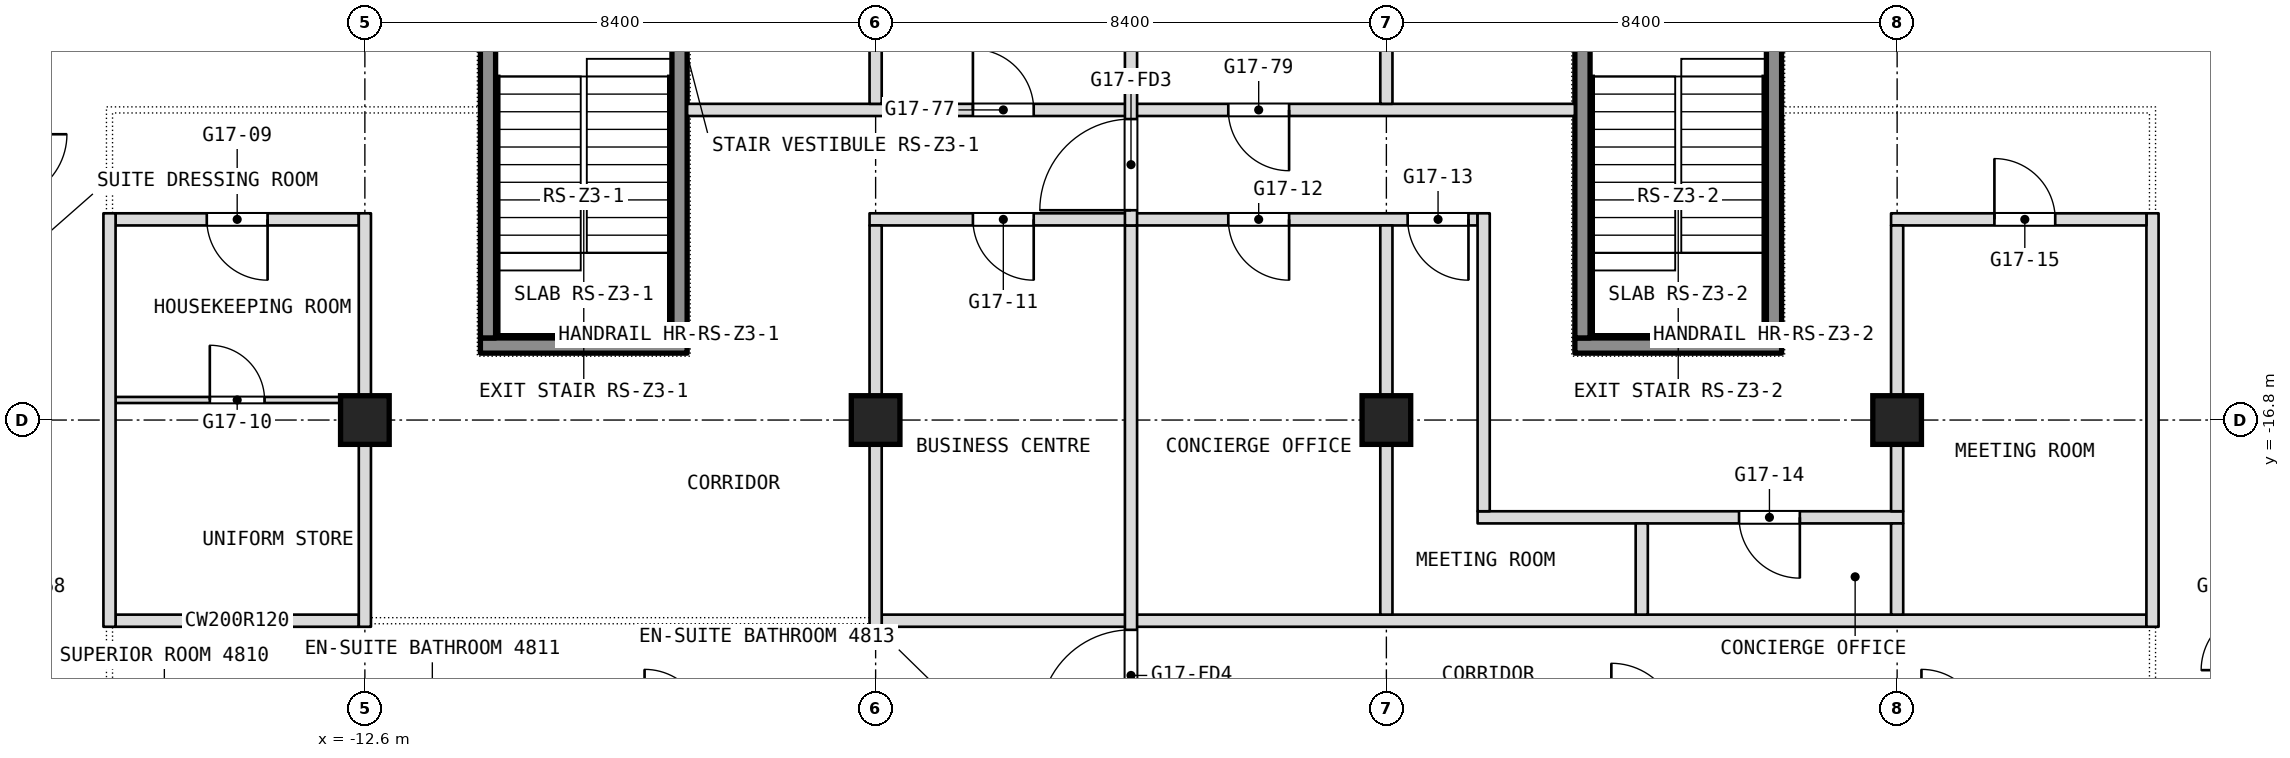
"""IFC4 building model, lengths in metres.
Left out: names, types, materials, properties, quantities, classifications, styles, units other than length and angle.
Written with IfcOpenShell. Run it as: python <this file> out.ifc"""

import sys

from ifc_helpers import new_model, si_unit, direction, frame, frame_2d, origin, origin_2d, place, context, subcontext, project, spatial, rectangle, extrude, element, fill, save


model = new_model("IFC4")
c1 = context("Model", 3, precision=1e-05, world=origin(), true_north=direction((0.0, 1.0)))
c2 = subcontext(c1, "Body", "Model", "MODEL_VIEW")
j1 = project(units=[si_unit("LENGTHUNIT", "METRE"), si_unit("PLANEANGLEUNIT", "RADIAN")], contexts=[c1])
p1 = place(None, origin())
s1 = spatial("IfcSite", under=j1, at=p1, CompositionType="ELEMENT")
p2 = place(p1, origin())
s2 = spatial("IfcBuilding", under=s1, at=p2, CompositionType="ELEMENT")
p3 = place(p2, frame((0.0, 0.0, 209.3)))
s3 = spatial("IfcBuildingStorey", under=s2, at=p3, CompositionType="ELEMENT", Elevation=209.3)
for number, where, z_axis, x_axis in (
    (1, (-12.6, -16.8, 0.0), (0.0, 0.0, 1.0), (1.0, 0.0, 0.0)),
    (2, (-4.2, -16.8, 0.0), (0.0, 0.0, 1.0), (1.0, 0.0, 0.0)),
    (3, (4.2, -16.8, 0.0), (0.0, 0.0, 1.0), (1.0, 0.0, 0.0)),
    (4, (12.6, -16.8, 0.0), (0.0, 0.0, 1.0), (1.0, 0.0, 0.0)),
):
    element("IfcColumn", number, at=place(p3, frame(where, z_axis=z_axis, x_axis=x_axis)), inside=s3, PredefinedType="COLUMN", context=c2, shape_type="SweptSolid", body=[
        extrude(rectangle(XDim=0.8, YDim=0.8, at=origin_2d()), origin(), (0.0, 0.0, 1.0), 3.6),
    ])
p4 = place(p3, frame((-16.7, -20.1, 0.0), z_axis=(0.0, 0.0, 1.0), x_axis=(1.0, 0.0, 0.0)))
e5 = element("IfcWall", 5, at=p4, inside=s3, PredefinedType="PARTITIONING", context=c2, shape_type="SweptSolid", body=[
    extrude(rectangle(XDim=4.0, YDim=0.2, at=frame_2d((2.0, 0.0))), origin(), (0.0, 0.0, 1.0), 3.34),
])
p5 = place(p3, frame((-4.1, -20.1, 0.0), z_axis=(0.0, 0.0, 1.0), x_axis=(1.0, 0.0, 0.0)))
e6 = element("IfcWall", 6, at=p5, inside=s3, PredefinedType="PARTITIONING", context=c2, shape_type="SweptSolid", body=[
    extrude(rectangle(XDim=20.8, YDim=0.2, at=frame_2d((10.4, 0.0))), origin(), (0.0, 0.0, 1.0), 3.34),
])
p6 = place(p3, frame((5.7, -18.4, 0.0), z_axis=(0.0, 0.0, 1.0), x_axis=(1.0, 0.0, 0.0)))
e7 = element("IfcWall", 7, at=p6, inside=s3, PredefinedType="PARTITIONING", context=c2, shape_type="SweptSolid", body=[
    extrude(rectangle(XDim=7.0, YDim=0.2, at=frame_2d((3.5, 0.0))), origin(), (0.0, 0.0, 1.0), 3.34),
])
p7 = place(p6, frame((4.3, 0.0, 0.0)))
e8 = element("IfcOpeningElement", 8, at=p7, cuts=e7, PredefinedType="OPENING", context=c2, shape_type="SweptSolid", body=[
    extrude(rectangle(XDim=1.0, YDim=2.1, at=frame_2d((0.5, 1.05))), frame((0.0, 0.1, 0.0), z_axis=(0.0, -1.0, 0.0), x_axis=(1.0, 0.0, 0.0)), (0.0, 0.0, 1.0), 0.2),
])
p8 = place(p3, frame((16.8, -20.2, 0.0), z_axis=(0.0, 0.0, 1.0), x_axis=(0.0, 1.0, 0.0)))
e9 = element("IfcWall", 9, at=p8, inside=s3, PredefinedType="PARTITIONING", context=c2, shape_type="SweptSolid", body=[
    extrude(rectangle(XDim=6.8, YDim=0.2, at=frame_2d((3.4, 0.0))), origin(), (0.0, 0.0, 1.0), 3.34),
])
p9 = place(p3, frame((-16.7, -16.47, 0.0), z_axis=(0.0, 0.0, 1.0), x_axis=(1.0, 0.0, 0.0)))
e10 = element("IfcWall", 10, at=p9, inside=s3, PredefinedType="PARTITIONING", context=c2, shape_type="SweptSolid", body=[
    extrude(rectangle(XDim=4.0, YDim=0.1, at=frame_2d((2.0, 0.0))), origin(), (0.0, 0.0, 1.0), 3.34),
])
p10 = place(p9, frame((1.55, 0.0, 0.0)))
e11 = element("IfcOpeningElement", 11, at=p10, cuts=e10, PredefinedType="OPENING", context=c2, shape_type="SweptSolid", body=[
    extrude(rectangle(XDim=0.9, YDim=2.1, at=frame_2d((0.45, 1.05))), frame((0.0, 0.05, 0.0), z_axis=(0.0, -1.0, 0.0), x_axis=(1.0, 0.0, 0.0)), (0.0, 0.0, 1.0), 0.1),
])
p11 = place(p3, frame((-16.7, -13.5, 0.0), z_axis=(0.0, 0.0, 1.0), x_axis=(1.0, 0.0, 0.0)))
e12 = element("IfcWall", 12, at=p11, inside=s3, PredefinedType="PARTITIONING", context=c2, shape_type="SweptSolid", body=[
    extrude(rectangle(XDim=4.0, YDim=0.2, at=frame_2d((2.0, 0.0))), origin(), (0.0, 0.0, 1.0), 3.34),
])
p12 = place(p11, frame((1.5, 0.0, 0.0)))
e13 = element("IfcOpeningElement", 13, at=p12, cuts=e12, PredefinedType="OPENING", context=c2, shape_type="SweptSolid", body=[
    extrude(rectangle(XDim=1.0, YDim=2.1, at=frame_2d((0.5, 1.05))), frame((0.0, 0.1, 0.0), z_axis=(0.0, -1.0, 0.0), x_axis=(1.0, 0.0, 0.0)), (0.0, 0.0, 1.0), 0.2),
])
p13 = place(p3, frame((-4.3, -13.5, 0.0), z_axis=(0.0, 0.0, 1.0), x_axis=(1.0, 0.0, 0.0)))
e14 = element("IfcWall", 14, at=p13, inside=s3, PredefinedType="PARTITIONING", context=c2, shape_type="SweptSolid", body=[
    extrude(rectangle(XDim=10.0, YDim=0.2, at=frame_2d((5.0, 0.0))), origin(), (0.0, 0.0, 1.0), 3.34),
])
p14 = place(p13, frame((1.7, 0.0, 0.0)))
e15 = element("IfcOpeningElement", 15, at=p14, cuts=e14, PredefinedType="OPENING", context=c2, shape_type="SweptSolid", body=[
    extrude(rectangle(XDim=1.0, YDim=2.1, at=frame_2d((0.5, 1.05))), frame((0.0, 0.1, 0.0), z_axis=(0.0, -1.0, 0.0), x_axis=(1.0, 0.0, 0.0)), (0.0, 0.0, 1.0), 0.2),
])
p15 = place(p13, frame((5.9, 0.0, 0.0)))
e16 = element("IfcOpeningElement", 16, at=p15, cuts=e14, PredefinedType="OPENING", context=c2, shape_type="SweptSolid", body=[
    extrude(rectangle(XDim=1.0, YDim=2.1, at=frame_2d((0.5, 1.05))), frame((0.0, 0.1, 0.0), z_axis=(0.0, -1.0, 0.0), x_axis=(1.0, 0.0, 0.0)), (0.0, 0.0, 1.0), 0.2),
])
p16 = place(p13, frame((8.85, 0.0, 0.0)))
e17 = element("IfcOpeningElement", 17, at=p16, cuts=e14, PredefinedType="OPENING", context=c2, shape_type="SweptSolid", body=[
    extrude(rectangle(XDim=1.0, YDim=2.1, at=frame_2d((0.5, 1.05))), frame((0.0, 0.1, 0.0), z_axis=(0.0, -1.0, 0.0), x_axis=(1.0, 0.0, 0.0)), (0.0, 0.0, 1.0), 0.2),
])
p17 = place(p3, frame((12.5, -13.5, 0.0), z_axis=(0.0, 0.0, 1.0), x_axis=(1.0, 0.0, 0.0)))
e18 = element("IfcWall", 18, at=p17, inside=s3, PredefinedType="PARTITIONING", context=c2, shape_type="SweptSolid", body=[
    extrude(rectangle(XDim=4.2, YDim=0.2, at=frame_2d((2.1, 0.0))), origin(), (0.0, 0.0, 1.0), 3.34),
])
p18 = place(p17, frame((1.7, 0.0, 0.0)))
e19 = element("IfcOpeningElement", 19, at=p18, cuts=e18, PredefinedType="OPENING", context=c2, shape_type="SweptSolid", body=[
    extrude(rectangle(XDim=1.0, YDim=2.1, at=frame_2d((0.5, 1.05))), frame((0.0, 0.1, 0.0), z_axis=(0.0, -1.0, 0.0), x_axis=(1.0, 0.0, 0.0)), (0.0, 0.0, 1.0), 0.2),
])
p19 = place(p3, frame((12.6, -20.0, 0.0), z_axis=(0.0, 0.0, 1.0), x_axis=(0.0, 1.0, 0.0)))
e20 = element("IfcWall", 20, at=p19, inside=s3, PredefinedType="PARTITIONING", context=c2, shape_type="SweptSolid", body=[
    extrude(rectangle(XDim=1.5, YDim=0.2, at=frame_2d((0.75, 0.0))), origin(), (0.0, 0.0, 1.0), 3.34),
])
p20 = place(p3, frame((12.6, -18.3, 0.0), z_axis=(0.0, 0.0, 1.0), x_axis=(0.0, 1.0, 0.0)))
e21 = element("IfcWall", 21, at=p20, inside=s3, PredefinedType="PARTITIONING", context=c2, shape_type="SweptSolid", body=[
    extrude(rectangle(XDim=4.7, YDim=0.2, at=frame_2d((2.35, 0.0))), origin(), (0.0, 0.0, 1.0), 3.34),
])
p21 = place(p3, frame((-7.3, -11.7, 0.0), z_axis=(0.0, 0.0, 1.0), x_axis=(1.0, 0.0, 0.0)))
e22 = element("IfcWall", 22, at=p21, inside=s3, PredefinedType="PARTITIONING", context=c2, shape_type="SweptSolid", body=[
    extrude(rectangle(XDim=14.6, YDim=0.2, at=frame_2d((7.3, 0.0))), origin(), (0.0, 0.0, 1.0), 3.34),
])
p22 = place(p21, frame((4.7, 0.0, 0.0)))
e23 = element("IfcOpeningElement", 23, at=p22, cuts=e22, PredefinedType="OPENING", context=c2, shape_type="SweptSolid", body=[
    extrude(rectangle(XDim=1.0, YDim=2.1, at=frame_2d((0.5, 1.05))), frame((0.0, 0.1, 0.0), z_axis=(0.0, -1.0, 0.0), x_axis=(1.0, 0.0, 0.0)), (0.0, 0.0, 1.0), 0.2),
])
p23 = place(p21, frame((8.9, 0.0, 0.0)))
e24 = element("IfcOpeningElement", 24, at=p23, cuts=e22, PredefinedType="OPENING", context=c2, shape_type="SweptSolid", body=[
    extrude(rectangle(XDim=1.0, YDim=2.1, at=frame_2d((0.5, 1.05))), frame((0.0, 0.1, 0.0), z_axis=(0.0, -1.0, 0.0), x_axis=(1.0, 0.0, 0.0)), (0.0, 0.0, 1.0), 0.2),
])
p24 = place(p3, frame((8.4, -20.0, 0.0), z_axis=(0.0, 0.0, 1.0), x_axis=(0.0, 1.0, 0.0)))
e25 = element("IfcWall", 25, at=p24, inside=s3, PredefinedType="PARTITIONING", context=c2, shape_type="SweptSolid", body=[
    extrude(rectangle(XDim=1.5, YDim=0.2, at=frame_2d((0.75, 0.0))), origin(), (0.0, 0.0, 1.0), 3.34),
])
p25 = place(p3, frame((5.8, -18.3, 0.0), z_axis=(0.0, 0.0, 1.0), x_axis=(0.0, 1.0, 0.0)))
e26 = element("IfcWall", 26, at=p25, inside=s3, PredefinedType="PARTITIONING", context=c2, shape_type="SweptSolid", body=[
    extrude(rectangle(XDim=4.9, YDim=0.2, at=frame_2d((2.45, 0.0))), origin(), (0.0, 0.0, 1.0), 3.34),
])
p26 = place(p3, frame((4.2, -20.0, 0.0), z_axis=(0.0, 0.0, 1.0), x_axis=(0.0, 1.0, 0.0)))
e27 = element("IfcWall", 27, at=p26, inside=s3, PredefinedType="PARTITIONING", context=c2, shape_type="SweptSolid", body=[
    extrude(rectangle(XDim=6.4, YDim=0.2, at=frame_2d((3.2, 0.0))), origin(), (0.0, 0.0, 1.0), 3.34),
])
p27 = place(p3, frame((4.2, -11.6, 0.0), z_axis=(0.0, 0.0, 1.0), x_axis=(0.0, 1.0, 0.0)))
e28 = element("IfcWall", 28, at=p27, inside=s3, PredefinedType="PARTITIONING", context=c2, shape_type="SweptSolid", body=[
    extrude(rectangle(XDim=9.7, YDim=0.2, at=frame_2d((4.85, 0.0))), origin(), (0.0, 0.0, 1.0), 3.34),
])
p28 = place(p3, frame((0.0, -22.0, 0.0), z_axis=(0.0, 0.0, 1.0), x_axis=(0.0, 1.0, 0.0)))
e29 = element("IfcWall", 29, at=p28, inside=s3, PredefinedType="PARTITIONING", context=c2, shape_type="SweptSolid", body=[
    extrude(rectangle(XDim=8.4, YDim=0.2, at=frame_2d((4.2, 0.0))), origin(), (0.0, 0.0, 1.0), 3.34),
])
p29 = place(p28, frame((0.25, 0.0, 0.0)))
e30 = element("IfcOpeningElement", 30, at=p29, cuts=e29, PredefinedType="OPENING", context=c2, shape_type="SweptSolid", body=[
    extrude(rectangle(XDim=1.5, YDim=2.1, at=frame_2d((0.75, 1.05))), frame((0.0, 0.1, 0.0), z_axis=(0.0, -1.0, 0.0), x_axis=(1.0, 0.0, 0.0)), (0.0, 0.0, 1.0), 0.2),
])
p30 = place(p3, frame((0.0, -13.6, 0.0), z_axis=(0.0, 0.0, 1.0), x_axis=(0.0, 1.0, 0.0)))
e31 = element("IfcWall", 31, at=p30, inside=s3, PredefinedType="PARTITIONING", context=c2, shape_type="SweptSolid", body=[
    extrude(rectangle(XDim=13.6, YDim=0.2, at=frame_2d((6.8, 0.0))), origin(), (0.0, 0.0, 1.0), 3.34),
])
p31 = place(p30, frame((11.95, 0.0, 0.0)))
e32 = element("IfcOpeningElement", 32, at=p31, cuts=e31, PredefinedType="OPENING", context=c2, shape_type="SweptSolid", body=[
    extrude(rectangle(XDim=1.5, YDim=2.1, at=frame_2d((0.75, 1.05))), frame((0.0, 0.1, 0.0), z_axis=(0.0, -1.0, 0.0), x_axis=(1.0, 0.0, 0.0)), (0.0, 0.0, 1.0), 0.2),
])
p32 = place(p30, frame((0.25, 0.0, 0.0)))
e33 = element("IfcOpeningElement", 33, at=p32, cuts=e31, PredefinedType="OPENING", context=c2, shape_type="SweptSolid", body=[
    extrude(rectangle(XDim=1.5, YDim=2.1, at=frame_2d((0.75, 1.05))), frame((0.0, 0.1, 0.0), z_axis=(0.0, -1.0, 0.0), x_axis=(1.0, 0.0, 0.0)), (0.0, 0.0, 1.0), 0.2),
])
p33 = place(p3, frame((-4.2, -11.6, 0.0), z_axis=(0.0, 0.0, 1.0), x_axis=(0.0, 1.0, 0.0)))
e34 = element("IfcWall", 34, at=p33, inside=s3, PredefinedType="PARTITIONING", context=c2, shape_type="SweptSolid", body=[
    extrude(rectangle(XDim=9.7, YDim=0.2, at=frame_2d((4.85, 0.0))), origin(), (0.0, 0.0, 1.0), 3.34),
])
p34 = place(p3, frame((-4.2, -20.2, 0.0), z_axis=(0.0, 0.0, 1.0), x_axis=(0.0, 1.0, 0.0)))
e35 = element("IfcWall", 35, at=p34, inside=s3, PredefinedType="PARTITIONING", context=c2, shape_type="SweptSolid", body=[
    extrude(rectangle(XDim=6.6, YDim=0.2, at=frame_2d((3.3, 0.0))), origin(), (0.0, 0.0, 1.0), 3.34),
])
for number, where, z_axis, x_axis in (
    (36, (-12.6, -20.2, 0.0), (0.0, 0.0, 1.0), (0.0, 1.0, 0.0)),
    (37, (-16.8, -20.2, 0.0), (0.0, 0.0, 1.0), (0.0, 1.0, 0.0)),
):
    element("IfcWall", number, at=place(p3, frame(where, z_axis=z_axis, x_axis=x_axis)), inside=s3, PredefinedType="PARTITIONING", context=c2, shape_type="SweptSolid", body=[
        extrude(rectangle(XDim=6.8, YDim=0.2, at=frame_2d((3.4, 0.0))), origin(), (0.0, 0.0, 1.0), 3.34),
    ])
p35 = place(p3, frame((-10.7, -15.575, 0.1), z_axis=(0.0, 0.0, 1.0), x_axis=(1.0, 0.0, 0.0)))
e38 = element("IfcWall", 38, at=p35, inside=s3, PredefinedType="SHEAR", context=c2, shape_type="SweptSolid", body=[
    extrude(rectangle(XDim=3.4, YDim=0.25, at=frame_2d((1.7, 0.0))), origin(), (0.0, 0.0, 1.0), 3.6),
])
for number, where, z_axis, x_axis in (
    (39, (-10.575, -15.45, 0.1), (0.0, 0.0, 1.0), (0.0, 1.0, 0.0)),
    (40, (-7.425, -15.45, 0.1), (0.0, 0.0, 1.0), (0.0, 1.0, 0.0)),
):
    element("IfcWall", number, at=place(p3, frame(where, z_axis=z_axis, x_axis=x_axis)), inside=s3, PredefinedType="SHEAR", context=c2, shape_type="SweptSolid", body=[
        extrude(rectangle(XDim=5.7, YDim=0.25, at=frame_2d((2.85, 0.0))), origin(), (0.0, 0.0, 1.0), 3.6),
    ])
p36 = place(p3, frame((7.3, -15.575, 0.1), z_axis=(0.0, 0.0, 1.0), x_axis=(1.0, 0.0, 0.0)))
e41 = element("IfcWall", 41, at=p36, inside=s3, PredefinedType="SHEAR", context=c2, shape_type="SweptSolid", body=[
    extrude(rectangle(XDim=3.4, YDim=0.25, at=frame_2d((1.7, 0.0))), origin(), (0.0, 0.0, 1.0), 3.6),
])
for number, where, z_axis, x_axis in (
    (42, (7.425, -15.45, 0.1), (0.0, 0.0, 1.0), (0.0, 1.0, 0.0)),
    (43, (10.575, -15.45, 0.1), (0.0, 0.0, 1.0), (0.0, 1.0, 0.0)),
):
    element("IfcWall", number, at=place(p3, frame(where, z_axis=z_axis, x_axis=x_axis)), inside=s3, PredefinedType="SHEAR", context=c2, shape_type="SweptSolid", body=[
        extrude(rectangle(XDim=5.7, YDim=0.25, at=frame_2d((2.85, 0.0))), origin(), (0.0, 0.0, 1.0), 3.6),
    ])
p37 = place(p7, origin())
e44 = element("IfcDoor", 44, at=p37, inside=s3, OperationType="SINGLE_SWING_LEFT", PredefinedType="DOOR", context=c2, shape_type="SweptSolid", body=[
    extrude(rectangle(XDim=1.0, YDim=2.1, at=frame_2d((0.5, 1.05))), frame((0.0, 0.025, 0.0), z_axis=(0.0, -1.0, 0.0), x_axis=(1.0, 0.0, 0.0)), (0.0, 0.0, 1.0), 0.05),
])
fill(e8, e44)
p38 = place(p10, origin())
e45 = element("IfcDoor", 45, at=p38, inside=s3, OperationType="SINGLE_SWING_LEFT", PredefinedType="DOOR", context=c2, shape_type="SweptSolid", body=[
    extrude(rectangle(XDim=0.9, YDim=2.1, at=frame_2d((0.45, 1.05))), frame((0.0, 0.025, 0.0), z_axis=(0.0, -1.0, 0.0), x_axis=(1.0, 0.0, 0.0)), (0.0, 0.0, 1.0), 0.05),
])
fill(e11, e45)
p39 = place(p12, origin())
e46 = element("IfcDoor", 46, at=p39, inside=s3, OperationType="SINGLE_SWING_LEFT", PredefinedType="DOOR", context=c2, shape_type="SweptSolid", body=[
    extrude(rectangle(XDim=1.0, YDim=2.1, at=frame_2d((0.5, 1.05))), frame((0.0, 0.025, 0.0), z_axis=(0.0, -1.0, 0.0), x_axis=(1.0, 0.0, 0.0)), (0.0, 0.0, 1.0), 0.05),
])
fill(e13, e46)
p40 = place(p14, origin())
e47 = element("IfcDoor", 47, at=p40, inside=s3, OperationType="SINGLE_SWING_LEFT", PredefinedType="DOOR", context=c2, shape_type="SweptSolid", body=[
    extrude(rectangle(XDim=1.0, YDim=2.1, at=frame_2d((0.5, 1.05))), frame((0.0, 0.025, 0.0), z_axis=(0.0, -1.0, 0.0), x_axis=(1.0, 0.0, 0.0)), (0.0, 0.0, 1.0), 0.05),
])
fill(e15, e47)
p41 = place(p15, origin())
e48 = element("IfcDoor", 48, at=p41, inside=s3, OperationType="SINGLE_SWING_RIGHT", PredefinedType="DOOR", context=c2, shape_type="SweptSolid", body=[
    extrude(rectangle(XDim=1.0, YDim=2.1, at=frame_2d((0.5, 1.05))), frame((0.0, 0.025, 0.0), z_axis=(0.0, -1.0, 0.0), x_axis=(1.0, 0.0, 0.0)), (0.0, 0.0, 1.0), 0.05),
])
fill(e16, e48)
p42 = place(p16, origin())
e49 = element("IfcDoor", 49, at=p42, inside=s3, OperationType="SINGLE_SWING_LEFT", PredefinedType="DOOR", context=c2, shape_type="SweptSolid", body=[
    extrude(rectangle(XDim=1.0, YDim=2.1, at=frame_2d((0.5, 1.05))), frame((0.0, 0.025, 0.0), z_axis=(0.0, -1.0, 0.0), x_axis=(1.0, 0.0, 0.0)), (0.0, 0.0, 1.0), 0.05),
])
fill(e17, e49)
p43 = place(p18, origin())
e50 = element("IfcDoor", 50, at=p43, inside=s3, OperationType="SINGLE_SWING_LEFT", PredefinedType="DOOR", context=c2, shape_type="SweptSolid", body=[
    extrude(rectangle(XDim=1.0, YDim=2.1, at=frame_2d((0.5, 1.05))), frame((0.0, 0.025, 0.0), z_axis=(0.0, -1.0, 0.0), x_axis=(1.0, 0.0, 0.0)), (0.0, 0.0, 1.0), 0.05),
])
fill(e19, e50)
p44 = place(p22, origin())
e51 = element("IfcDoor", 51, at=p44, inside=s3, OperationType="SINGLE_SWING_LEFT", PredefinedType="DOOR", context=c2, shape_type="SweptSolid", body=[
    extrude(rectangle(XDim=1.0, YDim=2.1, at=frame_2d((0.5, 1.05))), frame((0.0, 0.025, 0.0), z_axis=(0.0, -1.0, 0.0), x_axis=(1.0, 0.0, 0.0)), (0.0, 0.0, 1.0), 0.05),
])
fill(e23, e51)
p45 = place(p23, origin())
e52 = element("IfcDoor", 52, at=p45, inside=s3, OperationType="SINGLE_SWING_LEFT", PredefinedType="DOOR", context=c2, shape_type="SweptSolid", body=[
    extrude(rectangle(XDim=1.0, YDim=2.1, at=frame_2d((0.5, 1.05))), frame((0.0, 0.025, 0.0), z_axis=(0.0, -1.0, 0.0), x_axis=(1.0, 0.0, 0.0)), (0.0, 0.0, 1.0), 0.05),
])
fill(e24, e52)
p46 = place(p32, origin())
e53 = element("IfcDoor", 53, at=p46, inside=s3, OperationType="DOUBLE_DOOR_DOUBLE_SWING", PredefinedType="DOOR", context=c2, shape_type="SweptSolid", body=[
    extrude(rectangle(XDim=1.5, YDim=2.1, at=frame_2d((0.75, 1.05))), frame((0.0, 0.025, 0.0), z_axis=(0.0, -1.0, 0.0), x_axis=(1.0, 0.0, 0.0)), (0.0, 0.0, 1.0), 0.05),
])
fill(e33, e53)
p47 = place(p29, origin())
e54 = element("IfcDoor", 54, at=p47, inside=s3, OperationType="DOUBLE_DOOR_DOUBLE_SWING", PredefinedType="DOOR", context=c2, shape_type="SweptSolid", body=[
    extrude(rectangle(XDim=1.5, YDim=2.1, at=frame_2d((0.75, 1.05))), frame((0.0, 0.025, 0.0), z_axis=(0.0, -1.0, 0.0), x_axis=(1.0, 0.0, 0.0)), (0.0, 0.0, 1.0), 0.05),
])
fill(e30, e54)
save(model, sys.argv[1])
